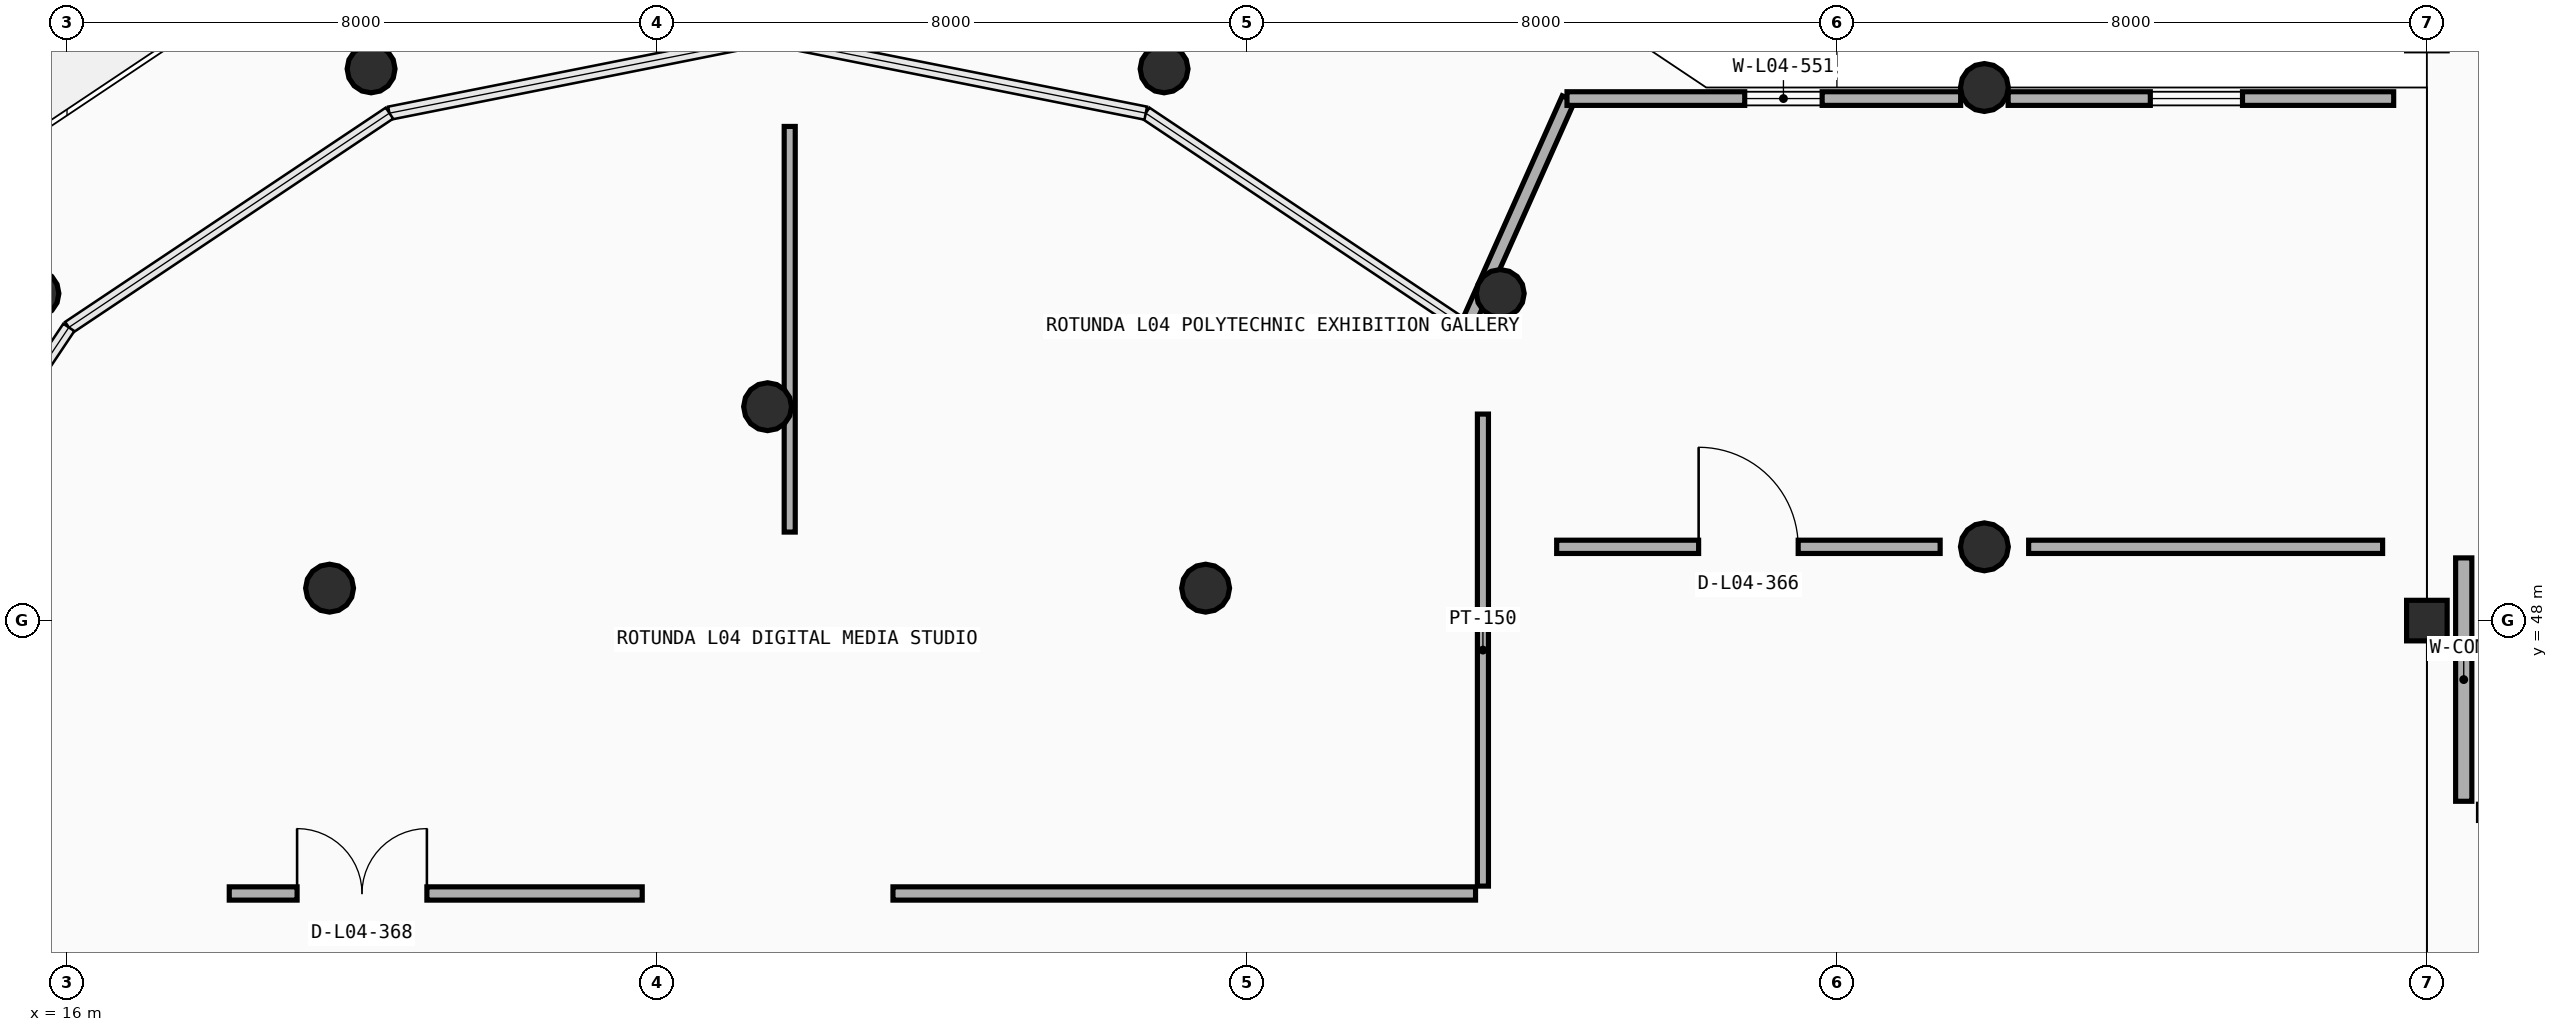
"""IFC4 building model, lengths in metres.
Left out: names, types, materials, properties, quantities, classifications, styles, units other than length and angle.
Written with IfcOpenShell. Run it as: python <this file> out.ifc"""

import sys

from ifc_helpers import new_model, si_unit, direction, frame, frame_2d, origin, origin_2d, place, context, subcontext, project, spatial, rectangle, circle, extrude, element, fill, save


model = new_model("IFC4")
c1 = context("Model", 3, precision=1e-05, world=origin(), true_north=direction((0.0, 1.0)))
c2 = subcontext(c1, "Body", "Model", "MODEL_VIEW")
j1 = project(units=[si_unit("LENGTHUNIT", "METRE"), si_unit("PLANEANGLEUNIT", "RADIAN")], contexts=[c1])
p1 = place(None, origin())
s1 = spatial("IfcSite", under=j1, at=p1, CompositionType="ELEMENT")
p2 = place(p1, origin())
s2 = spatial("IfcBuilding", under=s1, at=p2, CompositionType="ELEMENT")
p3 = place(p2, frame((0.0, 0.0, 13.8)))
s3 = spatial("IfcBuildingStorey", under=s2, at=p3, CompositionType="ELEMENT", Elevation=13.8)
p4 = place(p3, frame((48.0, 48.0, 0.0), z_axis=(0.0, 0.0, 1.0), x_axis=(1.0, 0.0, 0.0)))
e1 = element("IfcColumn", 1, at=p4, inside=s3, PredefinedType="COLUMN", context=c2, shape_type="SweptSolid", body=[
    extrude(rectangle(XDim=0.55, YDim=0.55, at=origin_2d()), origin(), (0.0, 0.0, 1.0), 4.2),
])
for number, where, z_axis, x_axis in (
    (2, (19.56, 48.44, 0.0), (0.0, 0.0, 1.0), (1.0, 0.0, 0.0)),
    (3, (31.44, 48.44, 0.0), (0.0, 0.0, 1.0), (1.0, 0.0, 0.0)),
    (4, (42.0, 49.0, 0.0), (0.0, 0.0, 1.0), (1.0, 0.0, 0.0)),
    (5, (25.5, 50.9, 0.0), (0.0, 0.0, 1.0), (1.0, 0.0, 0.0)),
    (6, (15.565, 52.435, 0.0), (0.0, 0.0, 1.0), (1.0, 0.0, 0.0)),
    (7, (35.435, 52.435, 0.0), (0.0, 0.0, 1.0), (1.0, 0.0, 0.0)),
    (8, (42.0, 55.228, 0.0), (0.0, 0.0, 1.0), (1.0, 0.0, 0.0)),
    (9, (20.123, 55.48, 0.0), (0.0, 0.0, 1.0), (1.0, 0.0, 0.0)),
    (10, (30.877, 55.48, 0.0), (0.0, 0.0, 1.0), (1.0, 0.0, 0.0)),
):
    element("IfcColumn", number, at=place(p3, frame(where, z_axis=z_axis, x_axis=x_axis)), inside=s3, PredefinedType="COLUMN", context=c2, shape_type="SweptSolid", body=[
        extrude(circle(Radius=0.325, at=origin_2d()), origin(), (0.0, 0.0, 1.0), 4.2),
    ])
p5 = place(p3, frame((38.143, 55.143, 0.0), z_axis=(0.0, 0.0, 1.0), x_axis=(-0.831468390799, 0.555572061125, 0.0)))
e11 = element("IfcWall", 11, at=p5, inside=s3, PredefinedType="PARAPET", context=c2, shape_type="SweptSolid", body=[
    extrude(rectangle(XDim=6.977, YDim=0.2, at=frame_2d((3.488, 0.0))), origin(), (0.0, 0.0, 1.0), 1.15),
])
p6 = place(p3, frame((19.542, 56.472, 0.0), z_axis=(0.0, 0.0, 1.0), x_axis=(-0.831481620435, -0.555552261158, 0.0)))
e12 = element("IfcWall", 12, at=p6, inside=s3, PredefinedType="PARAPET", context=c2, shape_type="SweptSolid", body=[
    extrude(rectangle(XDim=5.618, YDim=0.18, at=frame_2d((2.809, 0.0))), origin(), (0.0, 0.0, 1.0), 1.15),
])
p7 = place(p3, frame((34.975, 51.975, 0.0), z_axis=(0.0, 0.0, 1.0), x_axis=(0.40761125598, 0.913155553013, 0.0)))
e13 = element("IfcWall", 13, at=p7, inside=s3, PredefinedType="STANDARD", context=c2, shape_type="SweptSolid", body=[
    extrude(rectangle(XDim=3.398, YDim=0.185, at=frame_2d((1.699, 0.0))), origin(), (0.0, 0.0, 1.0), 3.35),
])
p8 = place(p3, frame((36.34, 55.078, 0.0), z_axis=(0.0, 0.0, 1.0), x_axis=(1.0, 0.0, 0.0)))
e14 = element("IfcWall", 14, at=p8, inside=s3, PredefinedType="STANDARD", context=c2, shape_type="SweptSolid", body=[
    extrude(rectangle(XDim=5.338, YDim=0.185, at=frame_2d((2.669, 0.0))), origin(), (0.0, 0.0, 1.0), 3.325),
])
p9 = place(p8, frame((2.41, 0.0, 0.9)))
e15 = element("IfcOpeningElement", 15, at=p9, cuts=e14, PredefinedType="OPENING", context=c2, shape_type="SweptSolid", body=[
    extrude(rectangle(XDim=1.05, YDim=1.25, at=frame_2d((0.525, 0.625))), frame((0.0, 0.103, 0.0), z_axis=(0.0, -1.0, 0.0), x_axis=(1.0, 0.0, 0.0)), (0.0, 0.0, 1.0), 0.205),
])
p10 = place(p3, frame((42.322, 55.078, 0.0), z_axis=(0.0, 0.0, 1.0), x_axis=(1.0, 0.0, 0.0)))
e16 = element("IfcWall", 16, at=p10, inside=s3, PredefinedType="STANDARD", context=c2, shape_type="SweptSolid", body=[
    extrude(rectangle(XDim=5.228, YDim=0.185, at=frame_2d((2.614, 0.0))), origin(), (0.0, 0.0, 1.0), 3.325),
])
p11 = place(p10, frame((1.928, 0.0, 0.9)))
e17 = element("IfcOpeningElement", 17, at=p11, cuts=e16, PredefinedType="OPENING", context=c2, shape_type="SweptSolid", body=[
    extrude(rectangle(XDim=1.25, YDim=1.25, at=frame_2d((0.625, 0.625))), frame((0.0, 0.103, 0.0), z_axis=(0.0, -1.0, 0.0), x_axis=(1.0, 0.0, 0.0)), (0.0, 0.0, 1.0), 0.205),
])
p12 = place(p3, frame((12.878, 55.122, 2.95), z_axis=(0.0, 0.0, 1.0), x_axis=(0.831472806966, 0.555565451838, 0.0)))
e18 = element("IfcWall", 18, at=p12, inside=s3, PredefinedType="PARAPET", context=c2, shape_type="SweptSolid", body=[
    extrude(rectangle(XDim=6.965, YDim=0.2, at=frame_2d((3.482, 0.0))), origin(), (0.0, 0.0, 1.0), 1.56),
])
p13 = place(p3, frame((14.39, 53.832, 2.95), z_axis=(0.0, 0.0, 1.0), x_axis=(0.831462553548, 0.555580797046, 0.0)))
e19 = element("IfcWall", 19, at=p13, inside=s3, PredefinedType="PARAPET", context=c2, shape_type="SweptSolid", body=[
    extrude(rectangle(XDim=5.884, YDim=0.18, at=frame_2d((2.942, 0.0))), origin(), (0.0, 0.0, 1.0), 1.56),
])
p14 = place(p3, frame((48.5, 45.55, 0.0), z_axis=(0.0, 0.0, 1.0), x_axis=(0.0, 1.0, 0.0)))
e20 = element("IfcWall", 20, at=p14, inside=s3, PredefinedType="PARTITIONING", context=c2, shape_type="SweptSolid", body=[
    extrude(rectangle(XDim=3.3, YDim=0.22, at=frame_2d((1.65, 0.0))), origin(), (0.0, 0.0, 1.0), 3.225),
])
p15 = place(p3, frame((42.6, 49.0, 0.0), z_axis=(0.0, 0.0, 1.0), x_axis=(1.0, 0.0, 0.0)))
e21 = element("IfcWall", 21, at=p15, inside=s3, PredefinedType="PARTITIONING", context=c2, shape_type="SweptSolid", body=[
    extrude(rectangle(XDim=4.8, YDim=0.18, at=frame_2d((2.4, 0.0))), origin(), (0.0, 0.0, 1.0), 3.275),
])
p16 = place(p3, frame((25.8, 49.2, 0.0), z_axis=(0.0, 0.0, 1.0), x_axis=(0.0, 1.0, 0.0)))
e22 = element("IfcWall", 22, at=p16, inside=s3, PredefinedType="PARTITIONING", context=c2, shape_type="SweptSolid", body=[
    extrude(rectangle(XDim=5.5, YDim=0.15, at=frame_2d((2.75, 0.0))), origin(), (0.0, 0.0, 1.0), 3.175),
])
p17 = place(p3, frame((36.2, 49.0, 0.0), z_axis=(0.0, 0.0, 1.0), x_axis=(1.0, 0.0, 0.0)))
e23 = element("IfcWall", 23, at=p17, inside=s3, PredefinedType="PARTITIONING", context=c2, shape_type="SweptSolid", body=[
    extrude(rectangle(XDim=5.2, YDim=0.18, at=frame_2d((2.6, 0.0))), origin(), (0.0, 0.0, 1.0), 3.3),
])
p18 = place(p17, frame((1.925, 0.0, 0.0)))
e24 = element("IfcOpeningElement", 24, at=p18, cuts=e23, PredefinedType="OPENING", context=c2, shape_type="SweptSolid", body=[
    extrude(rectangle(XDim=1.35, YDim=2.2, at=frame_2d((0.675, 1.1))), frame((0.0, 0.1, 0.0), z_axis=(0.0, -1.0, 0.0), x_axis=(1.0, 0.0, 0.0)), (0.0, 0.0, 1.0), 0.2),
])
p19 = place(p3, frame((27.2, 44.3, 0.0), z_axis=(0.0, 0.0, 1.0), x_axis=(1.0, 0.0, 0.0)))
e25 = element("IfcWall", 25, at=p19, inside=s3, PredefinedType="PARTITIONING", context=c2, shape_type="SweptSolid", body=[
    extrude(rectangle(XDim=7.9, YDim=0.18, at=frame_2d((3.95, 0.0))), origin(), (0.0, 0.0, 1.0), 3.3),
])
p20 = place(p3, frame((35.2, 44.4, 0.0), z_axis=(0.0, 0.0, 1.0), x_axis=(0.0, 1.0, 0.0)))
e26 = element("IfcWall", 26, at=p20, inside=s3, PredefinedType="PARTITIONING", context=c2, shape_type="SweptSolid", body=[
    extrude(rectangle(XDim=6.4, YDim=0.15, at=frame_2d((3.2, 0.0))), origin(), (0.0, 0.0, 1.0), 3.3),
])
p21 = place(p3, frame((18.2, 44.3, 0.0), z_axis=(0.0, 0.0, 1.0), x_axis=(1.0, 0.0, 0.0)))
e27 = element("IfcWall", 27, at=p21, inside=s3, PredefinedType="PARTITIONING", context=c2, shape_type="SweptSolid", body=[
    extrude(rectangle(XDim=5.6, YDim=0.18, at=frame_2d((2.8, 0.0))), origin(), (0.0, 0.0, 1.0), 3.3),
])
p22 = place(p21, frame((0.92, 0.0, 0.0)))
e28 = element("IfcOpeningElement", 28, at=p22, cuts=e27, PredefinedType="OPENING", context=c2, shape_type="SweptSolid", body=[
    extrude(rectangle(XDim=1.76, YDim=2.25, at=frame_2d((0.88, 1.125))), frame((0.0, 0.1, 0.0), z_axis=(0.0, -1.0, 0.0), x_axis=(1.0, 0.0, 0.0)), (0.0, 0.0, 1.0), 0.2),
])
p23 = place(p9, origin())
e29 = element("IfcWindow", 29, at=p23, inside=s3, PartitioningType="SINGLE_PANEL", PredefinedType="WINDOW", context=c2, shape_type="SweptSolid", body=[
    extrude(rectangle(XDim=1.05, YDim=1.25, at=frame_2d((0.525, 0.625))), frame((0.0, 0.03, 0.0), z_axis=(0.0, -1.0, 0.0), x_axis=(1.0, 0.0, 0.0)), (0.0, 0.0, 1.0), 0.06),
])
fill(e15, e29)
p24 = place(p11, origin())
e30 = element("IfcWindow", 30, at=p24, inside=s3, PartitioningType="SINGLE_PANEL", PredefinedType="WINDOW", context=c2, shape_type="SweptSolid", body=[
    extrude(rectangle(XDim=1.25, YDim=1.25, at=frame_2d((0.625, 0.625))), frame((0.0, 0.03, 0.0), z_axis=(0.0, -1.0, 0.0), x_axis=(1.0, 0.0, 0.0)), (0.0, 0.0, 1.0), 0.06),
])
fill(e17, e30)
p25 = place(p18, origin())
e31 = element("IfcDoor", 31, at=p25, inside=s3, OperationType="SINGLE_SWING_LEFT", PredefinedType="DOOR", context=c2, shape_type="SweptSolid", body=[
    extrude(rectangle(XDim=1.35, YDim=2.2, at=frame_2d((0.675, 1.1))), frame((0.0, 0.025, 0.0), z_axis=(0.0, -1.0, 0.0), x_axis=(1.0, 0.0, 0.0)), (0.0, 0.0, 1.0), 0.05),
])
fill(e24, e31)
p26 = place(p22, origin())
e32 = element("IfcDoor", 32, at=p26, inside=s3, OperationType="DOUBLE_DOOR_SINGLE_SWING", PredefinedType="DOOR", context=c2, shape_type="SweptSolid", body=[
    extrude(rectangle(XDim=1.76, YDim=2.25, at=frame_2d((0.88, 1.125))), frame((0.0, 0.025, 0.0), z_axis=(0.0, -1.0, 0.0), x_axis=(1.0, 0.0, 0.0)), (0.0, 0.0, 1.0), 0.05),
])
fill(e28, e32)
save(model, sys.argv[1])
